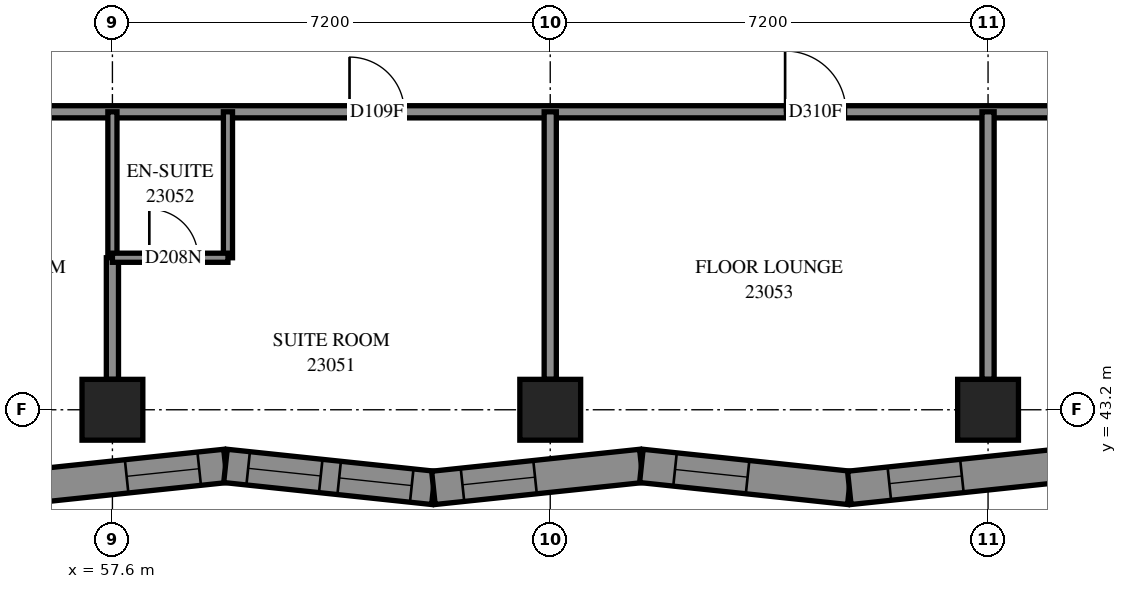
"""IFC4 building model, lengths in metres.
Left out: names, types, materials, properties, quantities, classifications, styles, units other than length and angle.
Written with IfcOpenShell. Run it as: python <this file> out.ifc"""

import sys

from ifc_helpers import new_model, si_unit, direction, frame, frame_2d, origin, origin_2d, place, context, subcontext, project, spatial, polyline, rectangle, outline, extrude, element, fill, save


model = new_model("IFC4")
c1 = context("Model", 3, precision=1e-05, world=origin(), true_north=direction((0.0, 1.0)))
c2 = subcontext(c1, "Body", "Model", "MODEL_VIEW")
j1 = project(units=[si_unit("LENGTHUNIT", "METRE"), si_unit("PLANEANGLEUNIT", "RADIAN")], contexts=[c1])
p1 = place(None, origin())
s1 = spatial("IfcSite", under=j1, at=p1, CompositionType="ELEMENT")
p2 = place(p1, origin())
s2 = spatial("IfcBuilding", under=s1, at=p2, CompositionType="ELEMENT")
p3 = place(p2, frame((0.0, 0.0, 88.0)))
s3 = spatial("IfcBuildingStorey", under=s2, at=p3, CompositionType="ELEMENT", Elevation=88.0)
for number, where, z_axis, x_axis in (
    (1, (57.6, 43.2, 0.0), (0.0, 0.0, 1.0), (1.0, 0.0, 0.0)),
    (2, (64.8, 43.2, 0.0), (0.0, 0.0, 1.0), (1.0, 0.0, 0.0)),
    (3, (72.0, 43.2, 0.0), (0.0, 0.0, 1.0), (1.0, 0.0, 0.0)),
):
    element("IfcColumn", number, at=place(p3, frame(where, z_axis=z_axis, x_axis=x_axis)), inside=s3, PredefinedType="COLUMN", context=c2, shape_type="SweptSolid", body=[
        extrude(rectangle(XDim=1.0, YDim=1.0, at=origin_2d()), origin(), (0.0, 0.0, 1.0), 3.1),
    ])
p4 = place(p3, frame((56.039, 41.916, 0.0), z_axis=(0.0, 0.0, 1.0), x_axis=(0.9944741767, 0.1049814831, 0.0)))
e4 = element("IfcWall", 4, at=p4, inside=s3, PredefinedType="SOLIDWALL", context=c2, shape_type="SweptSolid", body=[
    extrude(outline(polyline([(-0.029, -0.275), (3.41, -0.275), (3.468, 0.275), (0.029, 0.275), (-0.029, -0.275)])), origin(), (0.0, 0.0, 1.0), 3.1),
])
p5 = place(p4, frame((1.804, 0.0, 0.5)))
e5 = element("IfcOpeningElement", 5, at=p5, cuts=e4, PredefinedType="OPENING", context=c2, shape_type="SweptSolid", body=[
    extrude(rectangle(XDim=1.2, YDim=2.45, at=frame_2d((0.6, 1.225))), frame((0.0, 0.285, 0.0), z_axis=(0.0, -1.0, 0.0), x_axis=(1.0, 0.0, 0.0)), (0.0, 0.0, 1.0), 0.57),
])
p6 = place(p3, frame((59.459, 42.276, 0.0), z_axis=(0.0, 0.0, 1.0), x_axis=(0.9944741767, -0.1049814831, 0.0)))
e6 = element("IfcWall", 6, at=p6, inside=s3, PredefinedType="SOLIDWALL", context=c2, shape_type="SweptSolid", body=[
    extrude(outline(polyline([(0.029, -0.275), (3.468, -0.275), (3.41, 0.275), (-0.029, 0.275), (0.029, -0.275)])), origin(), (0.0, 0.0, 1.0), 3.1),
])
p7 = place(p6, frame((0.375, 0.0, 0.5)))
e7 = element("IfcOpeningElement", 7, at=p7, cuts=e6, PredefinedType="OPENING", context=c2, shape_type="SweptSolid", body=[
    extrude(rectangle(XDim=1.2, YDim=2.45, at=frame_2d((0.6, 1.225))), frame((0.0, 0.285, 0.0), z_axis=(0.0, -1.0, 0.0), x_axis=(1.0, 0.0, 0.0)), (0.0, 0.0, 1.0), 0.57),
])
p8 = place(p6, frame((1.88, 0.0, 0.5)))
e8 = element("IfcOpeningElement", 8, at=p8, cuts=e6, PredefinedType="OPENING", context=c2, shape_type="SweptSolid", body=[
    extrude(rectangle(XDim=1.2, YDim=2.45, at=frame_2d((0.6, 1.225))), frame((0.0, 0.285, 0.0), z_axis=(0.0, -1.0, 0.0), x_axis=(1.0, 0.0, 0.0)), (0.0, 0.0, 1.0), 0.57),
])
p9 = place(p3, frame((62.879, 41.916, 0.0), z_axis=(0.0, 0.0, 1.0), x_axis=(0.9944744972, 0.1049784471, 0.0)))
e9 = element("IfcWall", 9, at=p9, inside=s3, PredefinedType="SOLIDWALL", context=c2, shape_type="SweptSolid", body=[
    extrude(outline(polyline([(-0.029, -0.275), (3.41, -0.275), (3.468, 0.275), (0.029, 0.275), (-0.029, -0.275)])), origin(), (0.0, 0.0, 1.0), 3.1),
])
p10 = place(p9, frame((0.48, 0.0, 0.5)))
e10 = element("IfcOpeningElement", 10, at=p10, cuts=e9, PredefinedType="OPENING", context=c2, shape_type="SweptSolid", body=[
    extrude(rectangle(XDim=1.2, YDim=2.45, at=frame_2d((0.6, 1.225))), frame((0.0, 0.285, 0.0), z_axis=(0.0, -1.0, 0.0), x_axis=(1.0, 0.0, 0.0)), (0.0, 0.0, 1.0), 0.57),
])
p11 = place(p3, frame((66.299, 42.276, 0.0), z_axis=(0.0, 0.0, 1.0), x_axis=(0.9944741767, -0.1049814831, 0.0)))
e11 = element("IfcWall", 11, at=p11, inside=s3, PredefinedType="SOLIDWALL", context=c2, shape_type="SweptSolid", body=[
    extrude(outline(polyline([(0.029, -0.275), (3.468, -0.275), (3.41, 0.275), (-0.029, 0.275), (0.029, -0.275)])), origin(), (0.0, 0.0, 1.0), 3.1),
])
p12 = place(p11, frame((0.556, 0.0, 0.5)))
e12 = element("IfcOpeningElement", 12, at=p12, cuts=e11, PredefinedType="OPENING", context=c2, shape_type="SweptSolid", body=[
    extrude(rectangle(XDim=1.2, YDim=2.45, at=frame_2d((0.6, 1.225))), frame((0.0, 0.285, 0.0), z_axis=(0.0, -1.0, 0.0), x_axis=(1.0, 0.0, 0.0)), (0.0, 0.0, 1.0), 0.57),
])
p13 = place(p3, frame((69.718, 41.916, 0.0), z_axis=(0.0, 0.0, 1.0), x_axis=(0.9944739153, 0.1049839596, 0.0)))
e13 = element("IfcWall", 13, at=p13, inside=s3, PredefinedType="SOLIDWALL", context=c2, shape_type="SweptSolid", body=[
    extrude(outline(polyline([(-0.029, -0.275), (3.41, -0.275), (3.515, 0.275), (0.029, 0.275), (-0.029, -0.275)])), origin(), (0.0, 0.0, 1.0), 3.1),
])
p14 = place(p13, frame((0.662, 0.0, 0.5)))
e14 = element("IfcOpeningElement", 14, at=p14, cuts=e13, PredefinedType="OPENING", context=c2, shape_type="SweptSolid", body=[
    extrude(rectangle(XDim=1.2, YDim=2.45, at=frame_2d((0.6, 1.225))), frame((0.0, 0.285, 0.0), z_axis=(0.0, -1.0, 0.0), x_axis=(1.0, 0.0, 0.0)), (0.0, 0.0, 1.0), 0.57),
])
p15 = place(p3, frame((55.3, 48.1, 0.0), z_axis=(0.0, 0.0, 1.0), x_axis=(1.0, 0.0, 0.0)))
e15 = element("IfcWall", 15, at=p15, inside=s3, PredefinedType="PARTITIONING", context=c2, shape_type="SweptSolid", body=[
    extrude(rectangle(XDim=19.092, YDim=0.2, at=frame_2d((9.546, 0.0))), origin(), (0.0, 0.0, 1.0), 3.1),
])
p16 = place(p15, frame((6.199, 0.0, 0.0)))
e16 = element("IfcOpeningElement", 16, at=p16, cuts=e15, PredefinedType="OPENING", context=c2, shape_type="SweptSolid", body=[
    extrude(rectangle(XDim=0.9, YDim=2.1, at=frame_2d((0.45, 1.05))), frame((0.0, 0.11, 0.0), z_axis=(0.0, -1.0, 0.0), x_axis=(1.0, 0.0, 0.0)), (0.0, 0.0, 1.0), 0.22),
])
p17 = place(p15, frame((13.363, 0.0, 0.0)))
e17 = element("IfcOpeningElement", 17, at=p17, cuts=e15, PredefinedType="OPENING", context=c2, shape_type="SweptSolid", body=[
    extrude(rectangle(XDim=1.0, YDim=2.1, at=frame_2d((0.5, 1.05))), frame((0.0, 0.11, 0.0), z_axis=(0.0, -1.0, 0.0), x_axis=(1.0, 0.0, 0.0)), (0.0, 0.0, 1.0), 0.22),
])
for number, where, z_axis, x_axis in (
    (18, (64.8, 43.7, 0.0), (0.0, 0.0, 1.0), (0.0, 1.0, 0.0)),
    (19, (72.0, 43.7, 0.0), (0.0, 0.0, 1.0), (0.0, 1.0, 0.0)),
):
    element("IfcWall", number, at=place(p3, frame(where, z_axis=z_axis, x_axis=x_axis)), inside=s3, PredefinedType="PARTITIONING", context=c2, shape_type="SweptSolid", body=[
        extrude(rectangle(XDim=4.4, YDim=0.2, at=frame_2d((2.2, 0.0))), origin(), (0.0, 0.0, 1.0), 3.1),
    ])
for number, where, z_axis, x_axis in (
    (20, (59.5, 45.7, 0.0), (0.0, 0.0, 1.0), (0.0, 1.0, 0.0)),
    (21, (57.6, 45.7, 0.0), (0.0, 0.0, 1.0), (0.0, 1.0, 0.0)),
):
    element("IfcWall", number, at=place(p3, frame(where, z_axis=z_axis, x_axis=x_axis)), inside=s3, PredefinedType="PARTITIONING", context=c2, shape_type="SweptSolid", body=[
        extrude(rectangle(XDim=2.4, YDim=0.15, at=frame_2d((1.2, 0.0))), origin(), (0.0, 0.0, 1.0), 3.1),
    ])
p18 = place(p3, frame((57.6, 43.7, 0.0), z_axis=(0.0, 0.0, 1.0), x_axis=(0.0, 1.0, 0.0)))
e22 = element("IfcWall", 22, at=p18, inside=s3, PredefinedType="PARTITIONING", context=c2, shape_type="SweptSolid", body=[
    extrude(rectangle(XDim=2.0, YDim=0.2, at=frame_2d((1.0, 0.0))), origin(), (0.0, 0.0, 1.0), 3.1),
])
p19 = place(p3, frame((57.6, 45.7, 0.0), z_axis=(0.0, 0.0, 1.0), x_axis=(1.0, 0.0, 0.0)))
e23 = element("IfcWall", 23, at=p19, inside=s3, PredefinedType="PARTITIONING", context=c2, shape_type="SweptSolid", body=[
    extrude(rectangle(XDim=1.9, YDim=0.15, at=frame_2d((0.95, 0.0))), origin(), (0.0, 0.0, 1.0), 3.1),
])
p20 = place(p19, frame((0.607, 0.0, 0.0)))
e24 = element("IfcOpeningElement", 24, at=p20, cuts=e23, PredefinedType="OPENING", context=c2, shape_type="SweptSolid", body=[
    extrude(rectangle(XDim=0.8, YDim=2.1, at=frame_2d((0.4, 1.05))), frame((0.0, 0.085, 0.0), z_axis=(0.0, -1.0, 0.0), x_axis=(1.0, 0.0, 0.0)), (0.0, 0.0, 1.0), 0.17),
])
p21 = place(p5, origin())
e25 = element("IfcWindow", 25, at=p21, inside=s3, PartitioningType="SINGLE_PANEL", PredefinedType="WINDOW", context=c2, shape_type="SweptSolid", body=[
    extrude(rectangle(XDim=1.2, YDim=2.45, at=frame_2d((0.6, 1.225))), frame((0.0, 0.155, 0.0), z_axis=(0.0, -1.0, 0.0), x_axis=(1.0, 0.0, 0.0)), (0.0, 0.0, 1.0), 0.06),
])
fill(e5, e25)
p22 = place(p7, origin())
e26 = element("IfcWindow", 26, at=p22, inside=s3, PartitioningType="SINGLE_PANEL", PredefinedType="WINDOW", context=c2, shape_type="SweptSolid", body=[
    extrude(rectangle(XDim=1.2, YDim=2.45, at=frame_2d((0.6, 1.225))), frame((0.0, 0.155, 0.0), z_axis=(0.0, -1.0, 0.0), x_axis=(1.0, 0.0, 0.0)), (0.0, 0.0, 1.0), 0.06),
])
fill(e7, e26)
p23 = place(p8, origin())
e27 = element("IfcWindow", 27, at=p23, inside=s3, PartitioningType="SINGLE_PANEL", PredefinedType="WINDOW", context=c2, shape_type="SweptSolid", body=[
    extrude(rectangle(XDim=1.2, YDim=2.45, at=frame_2d((0.6, 1.225))), frame((0.0, 0.155, 0.0), z_axis=(0.0, -1.0, 0.0), x_axis=(1.0, 0.0, 0.0)), (0.0, 0.0, 1.0), 0.06),
])
fill(e8, e27)
p24 = place(p10, origin())
e28 = element("IfcWindow", 28, at=p24, inside=s3, PartitioningType="SINGLE_PANEL", PredefinedType="WINDOW", context=c2, shape_type="SweptSolid", body=[
    extrude(rectangle(XDim=1.2, YDim=2.45, at=frame_2d((0.6, 1.225))), frame((0.0, 0.155, 0.0), z_axis=(0.0, -1.0, 0.0), x_axis=(1.0, 0.0, 0.0)), (0.0, 0.0, 1.0), 0.06),
])
fill(e10, e28)
p25 = place(p12, origin())
e29 = element("IfcWindow", 29, at=p25, inside=s3, PartitioningType="SINGLE_PANEL", PredefinedType="WINDOW", context=c2, shape_type="SweptSolid", body=[
    extrude(rectangle(XDim=1.2, YDim=2.45, at=frame_2d((0.6, 1.225))), frame((0.0, 0.155, 0.0), z_axis=(0.0, -1.0, 0.0), x_axis=(1.0, 0.0, 0.0)), (0.0, 0.0, 1.0), 0.06),
])
fill(e12, e29)
p26 = place(p14, origin())
e30 = element("IfcWindow", 30, at=p26, inside=s3, PartitioningType="SINGLE_PANEL", PredefinedType="WINDOW", context=c2, shape_type="SweptSolid", body=[
    extrude(rectangle(XDim=1.2, YDim=2.45, at=frame_2d((0.6, 1.225))), frame((0.0, 0.155, 0.0), z_axis=(0.0, -1.0, 0.0), x_axis=(1.0, 0.0, 0.0)), (0.0, 0.0, 1.0), 0.06),
])
fill(e14, e30)
p27 = place(p16, origin())
e31 = element("IfcDoor", 31, at=p27, inside=s3, OperationType="SINGLE_SWING_LEFT", PredefinedType="DOOR", context=c2, shape_type="SweptSolid", body=[
    extrude(rectangle(XDim=0.9, YDim=2.1, at=frame_2d((0.45, 1.05))), frame((0.0, 0.025, 0.0), z_axis=(0.0, -1.0, 0.0), x_axis=(1.0, 0.0, 0.0)), (0.0, 0.0, 1.0), 0.05),
])
fill(e16, e31)
p28 = place(p20, origin())
e32 = element("IfcDoor", 32, at=p28, inside=s3, OperationType="SINGLE_SWING_RIGHT", PredefinedType="DOOR", context=c2, shape_type="SweptSolid", body=[
    extrude(rectangle(XDim=0.8, YDim=2.1, at=frame_2d((0.4, 1.05))), frame((0.0, 0.025, 0.0), z_axis=(0.0, -1.0, 0.0), x_axis=(1.0, 0.0, 0.0)), (0.0, 0.0, 1.0), 0.05),
])
fill(e24, e32)
p29 = place(p17, origin())
e33 = element("IfcDoor", 33, at=p29, inside=s3, OperationType="SINGLE_SWING_LEFT", PredefinedType="DOOR", context=c2, shape_type="SweptSolid", body=[
    extrude(rectangle(XDim=1.0, YDim=2.1, at=frame_2d((0.5, 1.05))), frame((0.0, 0.025, 0.0), z_axis=(0.0, -1.0, 0.0), x_axis=(1.0, 0.0, 0.0)), (0.0, 0.0, 1.0), 0.05),
])
fill(e17, e33)
save(model, sys.argv[1])
